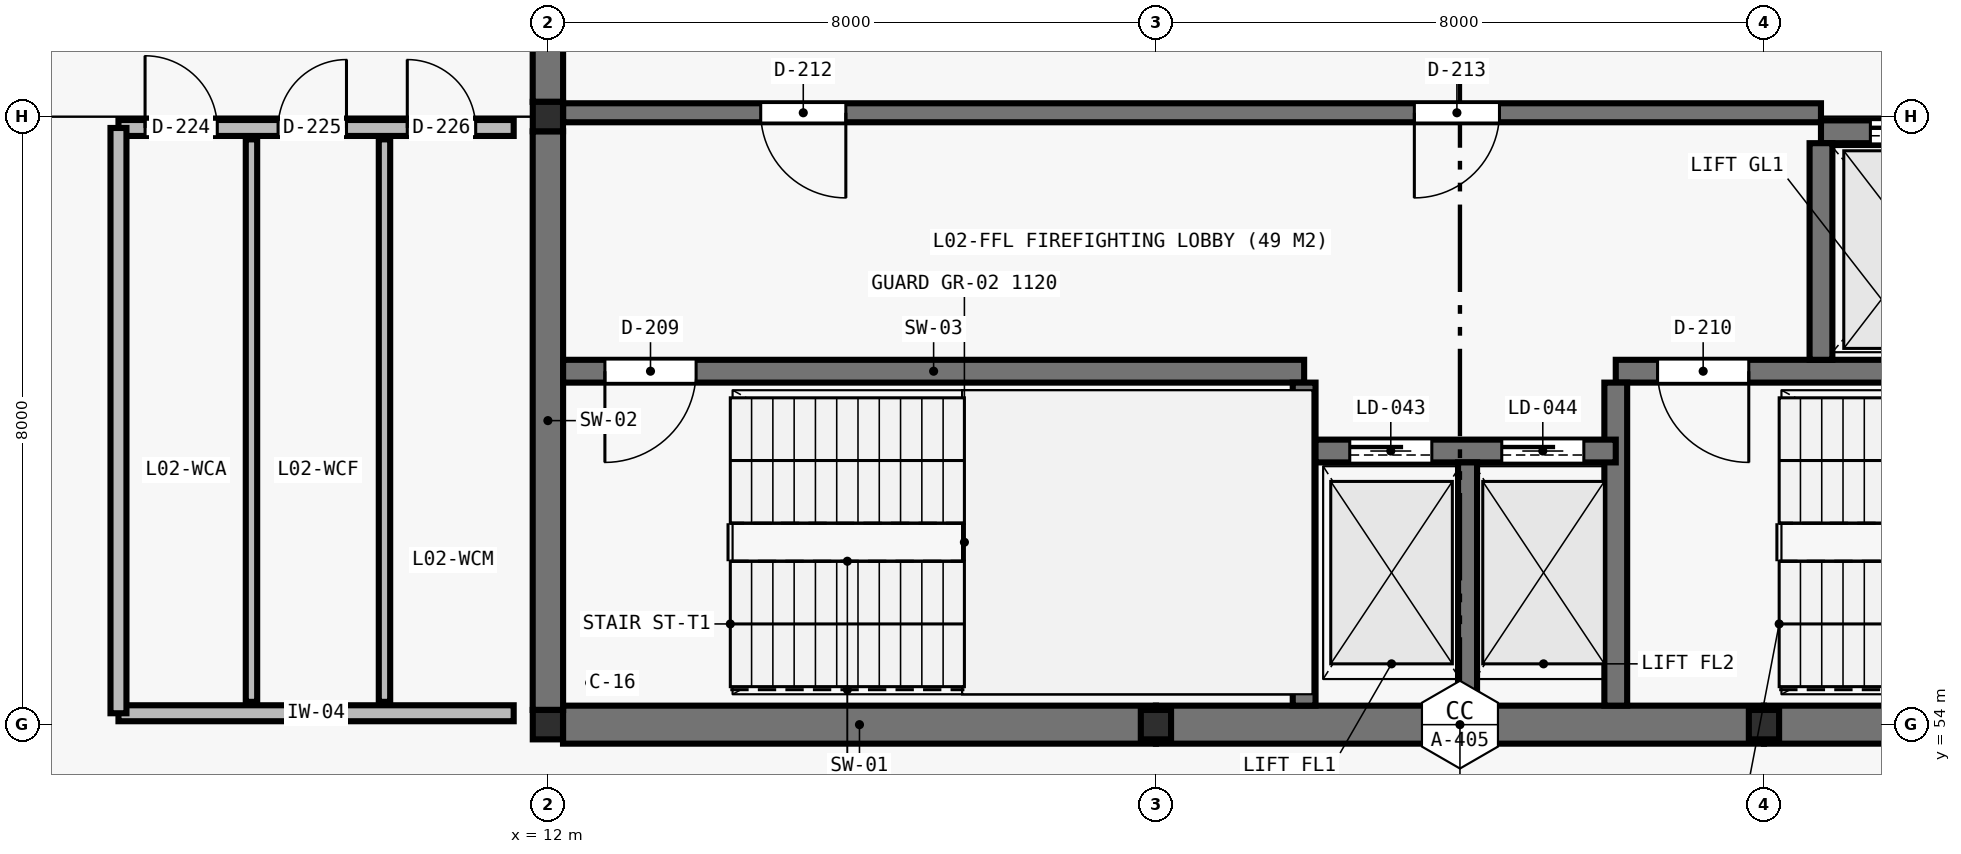
"""IFC4 building model, lengths in metres.
Left out: names, types, materials, properties, quantities, classifications, styles, units other than length and angle.
Written with IfcOpenShell. Run it as: python <this file> out.ifc"""

import sys

from ifc_helpers import new_model, si_unit, direction, frame, frame_2d, origin, origin_2d, place, context, subcontext, project, spatial, rectangle, i_section, extrude, element, fill, save


model = new_model("IFC4")
c1 = context("Model", 3, precision=1e-05, world=origin(), true_north=direction((0.0, 1.0)))
c2 = subcontext(c1, "Body", "Model", "MODEL_VIEW")
j1 = project(units=[si_unit("LENGTHUNIT", "METRE"), si_unit("PLANEANGLEUNIT", "RADIAN")], contexts=[c1])
p1 = place(None, origin())
s1 = spatial("IfcSite", under=j1, at=p1, CompositionType="ELEMENT")
p2 = place(p1, origin())
s2 = spatial("IfcBuilding", under=s1, at=p2, CompositionType="ELEMENT")
p3 = place(p2, frame((0.0, 0.0, 11.2)))
s3 = spatial("IfcBuildingStorey", under=s2, at=p3, CompositionType="ELEMENT", Elevation=11.2)
for number, where, z_axis, x_axis in (
    (1, (12.0, 54.0, 0.0), (0.0, 0.0, 1.0), (1.0, 0.0, 0.0)),
    (2, (12.0, 62.0, 0.0), (0.0, 0.0, 1.0), (1.0, 0.0, 0.0)),
    (3, (20.0, 54.0, 0.0), (0.0, 0.0, 1.0), (1.0, 0.0, 0.0)),
    (4, (28.0, 54.0, 0.0), (0.0, 0.0, 1.0), (1.0, 0.0, 0.0)),
):
    element("IfcColumn", number, at=place(p3, frame(where, z_axis=z_axis, x_axis=x_axis)), inside=s3, PredefinedType="COLUMN", context=c2, shape_type="SweptSolid", body=[
        extrude(i_section(OverallWidth=0.398, OverallDepth=0.387, WebThickness=0.021, FlangeThickness=0.033, at=origin_2d()), origin(), (0.0, 0.0, 1.0), 4.0),
    ])
p4 = place(p3, frame((12.199, 54.0, 0.0), z_axis=(0.0, 0.0, 1.0), x_axis=(1.0, 0.0, 0.0)))
e5 = element("IfcWall", 5, at=p4, inside=s3, PredefinedType="SHEAR", context=c2, shape_type="SweptSolid", body=[
    extrude(rectangle(XDim=7.801, YDim=0.5, at=frame_2d((3.9, 0.0))), origin(), (0.0, 0.0, 1.0), 4.0),
])
p5 = place(p3, frame((20.0, 54.0, 0.0), z_axis=(0.0, 0.0, 1.0), x_axis=(1.0, 0.0, 0.0)))
e6 = element("IfcWall", 6, at=p5, inside=s3, PredefinedType="SHEAR", context=c2, shape_type="SweptSolid", body=[
    extrude(rectangle(XDim=8.0, YDim=0.5, at=frame_2d((4.0, 0.0))), origin(), (0.0, 0.0, 1.0), 4.0),
])
p6 = place(p3, frame((28.0, 54.0, 0.0), z_axis=(0.0, 0.0, 1.0), x_axis=(1.0, 0.0, 0.0)))
e7 = element("IfcWall", 7, at=p6, inside=s3, PredefinedType="SHEAR", context=c2, shape_type="SweptSolid", body=[
    extrude(rectangle(XDim=7.801, YDim=0.5, at=frame_2d((3.9, 0.0))), origin(), (0.0, 0.0, 1.0), 4.0),
])
p7 = place(p3, frame((12.0, 54.194, 0.0), z_axis=(0.0, 0.0, 1.0), x_axis=(0.0, 1.0, 0.0)))
e8 = element("IfcWall", 8, at=p7, inside=s3, PredefinedType="SHEAR", context=c2, shape_type="SweptSolid", body=[
    extrude(rectangle(XDim=7.613, YDim=0.4, at=frame_2d((3.806, 0.0))), origin(), (0.0, 0.0, 1.0), 4.0),
])
p8 = place(p3, frame((12.0, 62.194, 0.0), z_axis=(0.0, 0.0, 1.0), x_axis=(0.0, 1.0, 0.0)))
e9 = element("IfcWall", 9, at=p8, inside=s3, PredefinedType="SHEAR", context=c2, shape_type="SweptSolid", body=[
    extrude(rectangle(XDim=7.613, YDim=0.4, at=frame_2d((3.806, 0.0))), origin(), (0.0, 0.0, 1.0), 4.0),
])
p9 = place(p8, frame((0.706, 0.0, 0.0)))
e10 = element("IfcOpeningElement", 10, at=p9, cuts=e9, PredefinedType="OPENING", context=c2, shape_type="SweptSolid", body=[
    extrude(rectangle(XDim=1.8, YDim=2.2, at=frame_2d((0.9, 1.1))), frame((0.0, 0.21, 0.0), z_axis=(0.0, -1.0, 0.0), x_axis=(1.0, 0.0, 0.0)), (0.0, 0.0, 1.0), 0.42),
])
p10 = place(p3, frame((12.2, 58.65, 0.0), z_axis=(0.0, 0.0, 1.0), x_axis=(1.0, 0.0, 0.0)))
e11 = element("IfcWall", 11, at=p10, inside=s3, PredefinedType="SHEAR", context=c2, shape_type="SweptSolid", body=[
    extrude(rectangle(XDim=9.75, YDim=0.3, at=frame_2d((4.875, 0.0))), origin(), (0.0, 0.0, 1.0), 4.0),
])
p11 = place(p10, frame((0.55, 0.0, 0.0)))
e12 = element("IfcOpeningElement", 12, at=p11, cuts=e11, PredefinedType="OPENING", context=c2, shape_type="SweptSolid", body=[
    extrude(rectangle(XDim=1.2, YDim=2.2, at=frame_2d((0.6, 1.1))), frame((0.0, 0.16, 0.0), z_axis=(0.0, -1.0, 0.0), x_axis=(1.0, 0.0, 0.0)), (0.0, 0.0, 1.0), 0.32),
])
p12 = place(p3, frame((21.95, 54.25, 0.0), z_axis=(0.0, 0.0, 1.0), x_axis=(0.0, 1.0, 0.0)))
e13 = element("IfcWall", 13, at=p12, inside=s3, PredefinedType="SHEAR", context=c2, shape_type="SweptSolid", body=[
    extrude(rectangle(XDim=4.25, YDim=0.3, at=frame_2d((2.125, 0.0))), origin(), (0.0, 0.0, 1.0), 4.0),
])
p13 = place(p3, frame((26.05, 58.65, 0.0), z_axis=(0.0, 0.0, 1.0), x_axis=(1.0, 0.0, 0.0)))
e14 = element("IfcWall", 14, at=p13, inside=s3, PredefinedType="SHEAR", context=c2, shape_type="SweptSolid", body=[
    extrude(rectangle(XDim=9.75, YDim=0.3, at=frame_2d((4.875, 0.0))), origin(), (0.0, 0.0, 1.0), 4.0),
])
p14 = place(p13, frame((0.55, 0.0, 0.0)))
e15 = element("IfcOpeningElement", 15, at=p14, cuts=e14, PredefinedType="OPENING", context=c2, shape_type="SweptSolid", body=[
    extrude(rectangle(XDim=1.2, YDim=2.2, at=frame_2d((0.6, 1.1))), frame((0.0, 0.16, 0.0), z_axis=(0.0, -1.0, 0.0), x_axis=(1.0, 0.0, 0.0)), (0.0, 0.0, 1.0), 0.32),
])
p15 = place(p3, frame((26.05, 54.25, 0.0), z_axis=(0.0, 0.0, 1.0), x_axis=(0.0, 1.0, 0.0)))
e16 = element("IfcWall", 16, at=p15, inside=s3, PredefinedType="SHEAR", context=c2, shape_type="SweptSolid", body=[
    extrude(rectangle(XDim=4.25, YDim=0.3, at=frame_2d((2.125, 0.0))), origin(), (0.0, 0.0, 1.0), 4.0),
])
p16 = place(p3, frame((22.1, 57.6, 0.0), z_axis=(0.0, 0.0, 1.0), x_axis=(1.0, 0.0, 0.0)))
e17 = element("IfcWall", 17, at=p16, inside=s3, PredefinedType="SHEAR", context=c2, shape_type="SweptSolid", body=[
    extrude(rectangle(XDim=3.95, YDim=0.3, at=frame_2d((1.975, 0.0))), origin(), (0.0, 0.0, 1.0), 4.0),
])
p17 = place(p16, frame((0.45, 0.0, 0.0)))
e18 = element("IfcOpeningElement", 18, at=p17, cuts=e17, PredefinedType="OPENING", context=c2, shape_type="SweptSolid", body=[
    extrude(rectangle(XDim=1.08, YDim=2.2, at=frame_2d((0.54, 1.1))), frame((0.0, 0.16, 0.0), z_axis=(0.0, -1.0, 0.0), x_axis=(1.0, 0.0, 0.0)), (0.0, 0.0, 1.0), 0.32),
])
p18 = place(p16, frame((2.45, 0.0, 0.0)))
e19 = element("IfcOpeningElement", 19, at=p18, cuts=e17, PredefinedType="OPENING", context=c2, shape_type="SweptSolid", body=[
    extrude(rectangle(XDim=1.08, YDim=2.2, at=frame_2d((0.54, 1.1))), frame((0.0, 0.16, 0.0), z_axis=(0.0, -1.0, 0.0), x_axis=(1.0, 0.0, 0.0)), (0.0, 0.0, 1.0), 0.32),
])
p19 = place(p3, frame((24.1, 54.25, 0.0), z_axis=(0.0, 0.0, 1.0), x_axis=(0.0, 1.0, 0.0)))
e20 = element("IfcWall", 20, at=p19, inside=s3, PredefinedType="SHEAR", context=c2, shape_type="SweptSolid", body=[
    extrude(rectangle(XDim=3.2, YDim=0.25, at=frame_2d((1.6, 0.0))), origin(), (0.0, 0.0, 1.0), 4.0),
])
p20 = place(p3, frame((28.75, 61.8, 0.0), z_axis=(0.0, 0.0, 1.0), x_axis=(1.0, 0.0, 0.0)))
e21 = element("IfcWall", 21, at=p20, inside=s3, PredefinedType="SHEAR", context=c2, shape_type="SweptSolid", body=[
    extrude(rectangle(XDim=5.0, YDim=0.3, at=frame_2d((2.5, 0.0))), origin(), (0.0, 0.0, 1.0), 4.0),
])
p21 = place(p20, frame((0.65, 0.0, 0.0)))
e22 = element("IfcOpeningElement", 22, at=p21, cuts=e21, PredefinedType="OPENING", context=c2, shape_type="SweptSolid", body=[
    extrude(rectangle(XDim=1.3, YDim=2.3, at=frame_2d((0.65, 1.15))), frame((0.0, 0.16, 0.0), z_axis=(0.0, -1.0, 0.0), x_axis=(1.0, 0.0, 0.0)), (0.0, 0.0, 1.0), 0.32),
])
p22 = place(p20, frame((3.1, 0.0, 0.0)))
e23 = element("IfcOpeningElement", 23, at=p22, cuts=e21, PredefinedType="OPENING", context=c2, shape_type="SweptSolid", body=[
    extrude(rectangle(XDim=1.08, YDim=2.2, at=frame_2d((0.54, 1.1))), frame((0.0, 0.16, 0.0), z_axis=(0.0, -1.0, 0.0), x_axis=(1.0, 0.0, 0.0)), (0.0, 0.0, 1.0), 0.32),
])
p23 = place(p3, frame((28.75, 58.8, 0.0), z_axis=(0.0, 0.0, 1.0), x_axis=(0.0, 1.0, 0.0)))
e24 = element("IfcWall", 24, at=p23, inside=s3, PredefinedType="SHEAR", context=c2, shape_type="SweptSolid", body=[
    extrude(rectangle(XDim=2.85, YDim=0.3, at=frame_2d((1.425, 0.0))), origin(), (0.0, 0.0, 1.0), 4.0),
])
p24 = place(p3, frame((12.2, 62.05, 0.0), z_axis=(0.0, 0.0, 1.0), x_axis=(1.0, 0.0, 0.0)))
e25 = element("IfcWall", 25, at=p24, inside=s3, PredefinedType="SHEAR", context=c2, shape_type="SweptSolid", body=[
    extrude(rectangle(XDim=16.55, YDim=0.25, at=frame_2d((8.275, 0.0))), origin(), (0.0, 0.0, 1.0), 4.0),
])
p25 = place(p24, frame((2.6, 0.0, 0.0)))
e26 = element("IfcOpeningElement", 26, at=p25, cuts=e25, PredefinedType="OPENING", context=c2, shape_type="SweptSolid", body=[
    extrude(rectangle(XDim=1.12, YDim=2.22, at=frame_2d((0.56, 1.11))), frame((0.0, 0.135, 0.0), z_axis=(0.0, -1.0, 0.0), x_axis=(1.0, 0.0, 0.0)), (0.0, 0.0, 1.0), 0.27),
])
p26 = place(p24, frame((11.2, 0.0, 0.0)))
e27 = element("IfcOpeningElement", 27, at=p26, cuts=e25, PredefinedType="OPENING", context=c2, shape_type="SweptSolid", body=[
    extrude(rectangle(XDim=1.12, YDim=2.22, at=frame_2d((0.56, 1.11))), frame((0.0, 0.135, 0.0), z_axis=(0.0, -1.0, 0.0), x_axis=(1.0, 0.0, 0.0)), (0.0, 0.0, 1.0), 0.27),
])
p27 = place(p3, frame((6.35, 61.85, 0.0), z_axis=(0.0, 0.0, 1.0), x_axis=(1.0, 0.0, 0.0)))
e28 = element("IfcWall", 28, at=p27, inside=s3, PredefinedType="PLUMBINGWALL", context=c2, shape_type="SweptSolid", body=[
    extrude(rectangle(XDim=5.2, YDim=0.21, at=frame_2d((2.6, 0.0))), origin(), (0.0, 0.0, 1.0), 3.25),
])
p28 = place(p27, frame((0.35, 0.0, 0.0)))
e29 = element("IfcOpeningElement", 29, at=p28, cuts=e28, PredefinedType="OPENING", context=c2, shape_type="SweptSolid", body=[
    extrude(rectangle(XDim=0.95, YDim=2.1, at=frame_2d((0.475, 1.05))), frame((0.0, 0.115, 0.0), z_axis=(0.0, -1.0, 0.0), x_axis=(1.0, 0.0, 0.0)), (0.0, 0.0, 1.0), 0.23),
])
p29 = place(p27, frame((2.1, 0.0, 0.0)))
e30 = element("IfcOpeningElement", 30, at=p29, cuts=e28, PredefinedType="OPENING", context=c2, shape_type="SweptSolid", body=[
    extrude(rectangle(XDim=0.9, YDim=2.1, at=frame_2d((0.45, 1.05))), frame((0.0, 0.115, 0.0), z_axis=(0.0, -1.0, 0.0), x_axis=(1.0, 0.0, 0.0)), (0.0, 0.0, 1.0), 0.23),
])
p30 = place(p27, frame((3.8, 0.0, 0.0)))
e31 = element("IfcOpeningElement", 31, at=p30, cuts=e28, PredefinedType="OPENING", context=c2, shape_type="SweptSolid", body=[
    extrude(rectangle(XDim=0.9, YDim=2.1, at=frame_2d((0.45, 1.05))), frame((0.0, 0.115, 0.0), z_axis=(0.0, -1.0, 0.0), x_axis=(1.0, 0.0, 0.0)), (0.0, 0.0, 1.0), 0.23),
])
p31 = place(p3, frame((6.35, 54.15, 0.0), z_axis=(0.0, 0.0, 1.0), x_axis=(1.0, 0.0, 0.0)))
e32 = element("IfcWall", 32, at=p31, inside=s3, PredefinedType="PLUMBINGWALL", context=c2, shape_type="SweptSolid", body=[
    extrude(rectangle(XDim=5.2, YDim=0.21, at=frame_2d((2.6, 0.0))), origin(), (0.0, 0.0, 1.0), 3.25),
])
p32 = place(p3, frame((6.35, 54.15, 0.0), z_axis=(0.0, 0.0, 1.0), x_axis=(0.0, 1.0, 0.0)))
e33 = element("IfcWall", 33, at=p32, inside=s3, PredefinedType="PLUMBINGWALL", context=c2, shape_type="SweptSolid", body=[
    extrude(rectangle(XDim=7.7, YDim=0.21, at=frame_2d((3.85, 0.0))), origin(), (0.0, 0.0, 1.0), 4.0),
])
for number, where, z_axis, x_axis in (
    (34, (8.1, 54.3, 0.0), (0.0, 0.0, 1.0), (0.0, 1.0, 0.0)),
    (35, (9.85, 54.3, 0.0), (0.0, 0.0, 1.0), (0.0, 1.0, 0.0)),
):
    element("IfcWall", number, at=place(p3, frame(where, z_axis=z_axis, x_axis=x_axis)), inside=s3, PredefinedType="PARTITIONING", context=c2, shape_type="SweptSolid", body=[
        extrude(rectangle(XDim=7.4, YDim=0.15, at=frame_2d((3.7, 0.0))), origin(), (0.0, 0.0, 1.0), 4.0),
    ])
p33 = place(p11, frame((1.2, 0.0, 0.0), z_axis=(0.0, 0.0, 1.0), x_axis=(-1.0, 0.0, 0.0)))
e36 = element("IfcDoor", 36, at=p33, inside=s3, OperationType="SINGLE_SWING_RIGHT", PredefinedType="DOOR", context=c2, shape_type="SweptSolid", body=[
    extrude(rectangle(XDim=1.2, YDim=2.2, at=frame_2d((0.6, 1.1))), frame((0.0, 0.025, 0.0), z_axis=(0.0, -1.0, 0.0), x_axis=(1.0, 0.0, 0.0)), (0.0, 0.0, 1.0), 0.05),
])
fill(e12, e36)
p34 = place(p14, frame((1.2, 0.0, 0.0), z_axis=(0.0, 0.0, 1.0), x_axis=(-1.0, 0.0, 0.0)))
e37 = element("IfcDoor", 37, at=p34, inside=s3, OperationType="SINGLE_SWING_LEFT", PredefinedType="DOOR", context=c2, shape_type="SweptSolid", body=[
    extrude(rectangle(XDim=1.2, YDim=2.2, at=frame_2d((0.6, 1.1))), frame((0.0, 0.025, 0.0), z_axis=(0.0, -1.0, 0.0), x_axis=(1.0, 0.0, 0.0)), (0.0, 0.0, 1.0), 0.05),
])
fill(e15, e37)
p35 = place(p17, origin())
e38 = element("IfcDoor", 38, at=p35, inside=s3, OperationType="SLIDING_TO_LEFT", PredefinedType="DOOR", context=c2, shape_type="SweptSolid", body=[
    extrude(rectangle(XDim=1.08, YDim=2.2, at=frame_2d((0.54, 1.1))), frame((0.0, 0.025, 0.0), z_axis=(0.0, -1.0, 0.0), x_axis=(1.0, 0.0, 0.0)), (0.0, 0.0, 1.0), 0.05),
])
fill(e18, e38)
p36 = place(p18, origin())
e39 = element("IfcDoor", 39, at=p36, inside=s3, OperationType="SLIDING_TO_LEFT", PredefinedType="DOOR", context=c2, shape_type="SweptSolid", body=[
    extrude(rectangle(XDim=1.08, YDim=2.2, at=frame_2d((0.54, 1.1))), frame((0.0, 0.025, 0.0), z_axis=(0.0, -1.0, 0.0), x_axis=(1.0, 0.0, 0.0)), (0.0, 0.0, 1.0), 0.05),
])
fill(e19, e39)
p37 = place(p21, origin())
e40 = element("IfcDoor", 40, at=p37, inside=s3, OperationType="SLIDING_TO_LEFT", PredefinedType="DOOR", context=c2, shape_type="SweptSolid", body=[
    extrude(rectangle(XDim=1.3, YDim=2.3, at=frame_2d((0.65, 1.15))), frame((0.0, 0.025, 0.0), z_axis=(0.0, -1.0, 0.0), x_axis=(1.0, 0.0, 0.0)), (0.0, 0.0, 1.0), 0.05),
])
fill(e22, e40)
p38 = place(p25, frame((1.12, 0.0, 0.0), z_axis=(0.0, 0.0, 1.0), x_axis=(-1.0, 0.0, 0.0)))
e41 = element("IfcDoor", 41, at=p38, inside=s3, OperationType="SINGLE_SWING_LEFT", PredefinedType="DOOR", context=c2, shape_type="SweptSolid", body=[
    extrude(rectangle(XDim=1.12, YDim=2.22, at=frame_2d((0.56, 1.11))), frame((0.0, 0.025, 0.0), z_axis=(0.0, -1.0, 0.0), x_axis=(1.0, 0.0, 0.0)), (0.0, 0.0, 1.0), 0.05),
])
fill(e26, e41)
p39 = place(p26, frame((1.12, 0.0, 0.0), z_axis=(0.0, 0.0, 1.0), x_axis=(-1.0, 0.0, 0.0)))
e42 = element("IfcDoor", 42, at=p39, inside=s3, OperationType="SINGLE_SWING_RIGHT", PredefinedType="DOOR", context=c2, shape_type="SweptSolid", body=[
    extrude(rectangle(XDim=1.12, YDim=2.22, at=frame_2d((0.56, 1.11))), frame((0.0, 0.025, 0.0), z_axis=(0.0, -1.0, 0.0), x_axis=(1.0, 0.0, 0.0)), (0.0, 0.0, 1.0), 0.05),
])
fill(e27, e42)
p40 = place(p28, origin())
e43 = element("IfcDoor", 43, at=p40, inside=s3, OperationType="SINGLE_SWING_LEFT", PredefinedType="DOOR", context=c2, shape_type="SweptSolid", body=[
    extrude(rectangle(XDim=0.95, YDim=2.1, at=frame_2d((0.475, 1.05))), frame((0.0, 0.025, 0.0), z_axis=(0.0, -1.0, 0.0), x_axis=(1.0, 0.0, 0.0)), (0.0, 0.0, 1.0), 0.05),
])
fill(e29, e43)
p41 = place(p29, origin())
e44 = element("IfcDoor", 44, at=p41, inside=s3, OperationType="SINGLE_SWING_RIGHT", PredefinedType="DOOR", context=c2, shape_type="SweptSolid", body=[
    extrude(rectangle(XDim=0.9, YDim=2.1, at=frame_2d((0.45, 1.05))), frame((0.0, 0.025, 0.0), z_axis=(0.0, -1.0, 0.0), x_axis=(1.0, 0.0, 0.0)), (0.0, 0.0, 1.0), 0.05),
])
fill(e30, e44)
p42 = place(p30, origin())
e45 = element("IfcDoor", 45, at=p42, inside=s3, OperationType="SINGLE_SWING_LEFT", PredefinedType="DOOR", context=c2, shape_type="SweptSolid", body=[
    extrude(rectangle(XDim=0.9, YDim=2.1, at=frame_2d((0.45, 1.05))), frame((0.0, 0.025, 0.0), z_axis=(0.0, -1.0, 0.0), x_axis=(1.0, 0.0, 0.0)), (0.0, 0.0, 1.0), 0.05),
])
fill(e31, e45)
save(model, sys.argv[1])
